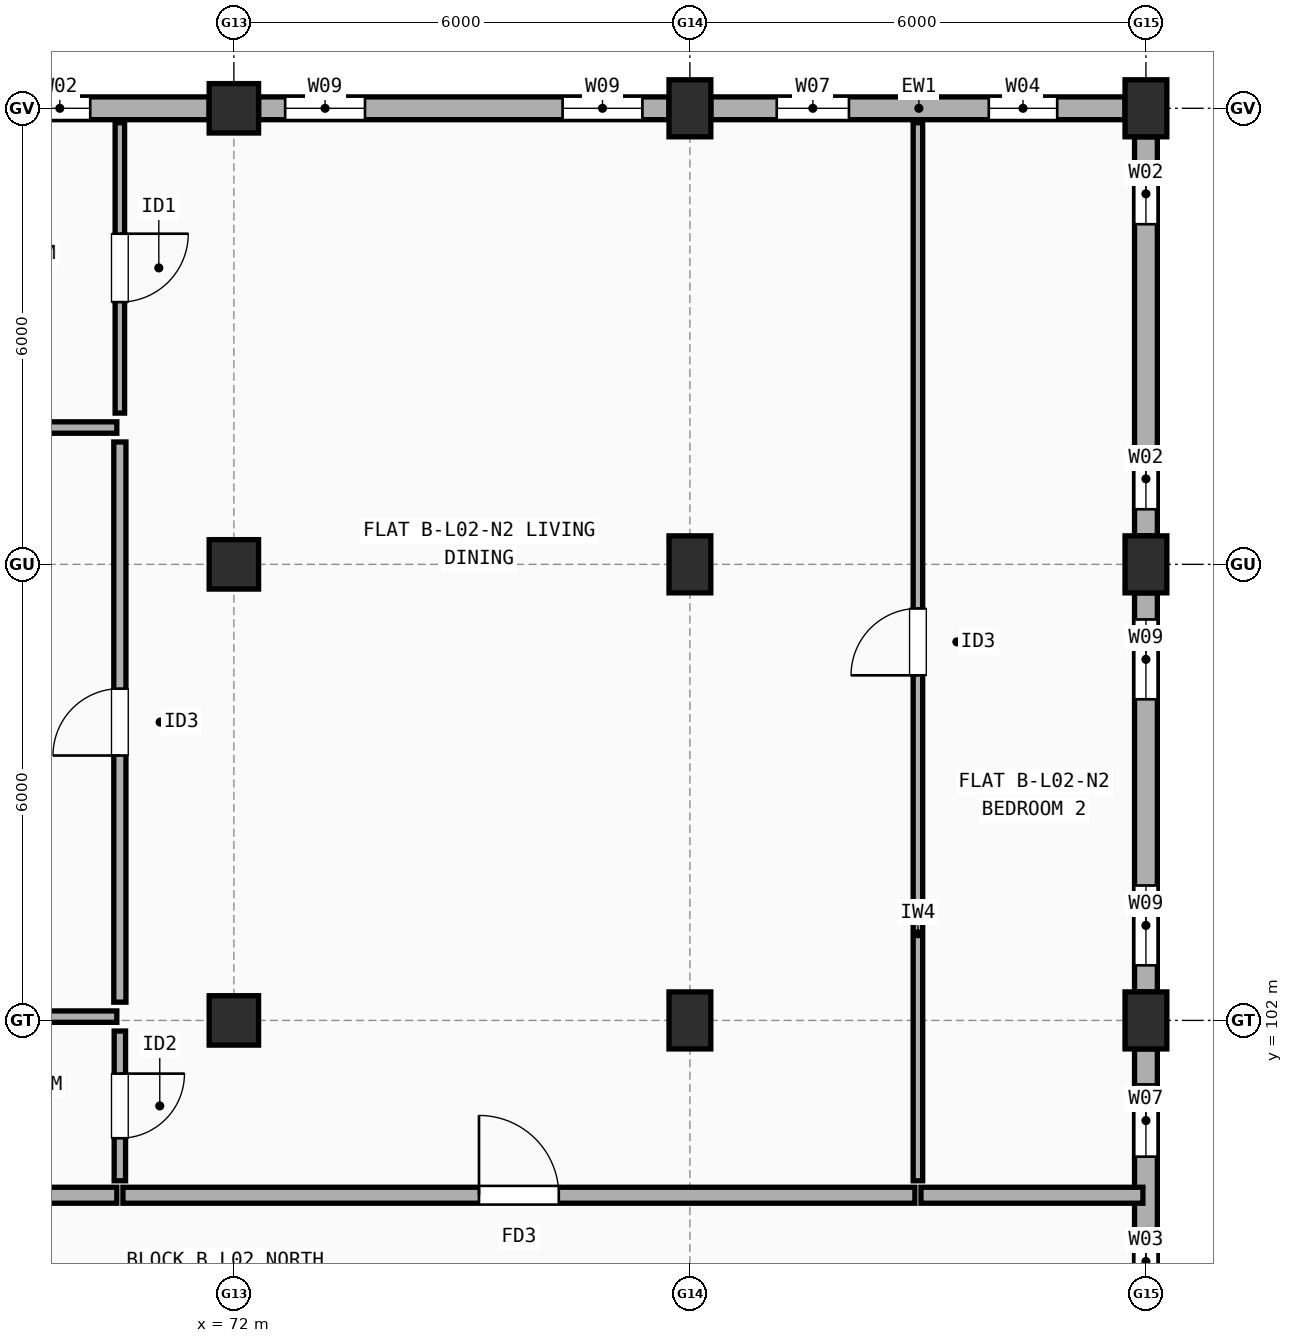
"""IFC4 building model, lengths in metres.
Left out: names, types, materials, properties, quantities, classifications, styles, units other than length and angle.
Written with IfcOpenShell. Run it as: python <this file> out.ifc"""

import sys

from ifc_helpers import new_model, si_unit, direction, frame, frame_2d, origin, origin_2d, place, context, subcontext, project, spatial, rectangle, extrude, element, fill, save


model = new_model("IFC4")
c1 = context("Model", 3, precision=1e-05, world=origin(), true_north=direction((0.0, 1.0)))
c2 = subcontext(c1, "Body", "Model", "MODEL_VIEW")
j1 = project(units=[si_unit("LENGTHUNIT", "METRE"), si_unit("PLANEANGLEUNIT", "RADIAN")], contexts=[c1])
p1 = place(None, origin())
s1 = spatial("IfcSite", under=j1, at=p1, CompositionType="ELEMENT")
p2 = place(p1, origin())
s2 = spatial("IfcBuilding", under=s1, at=p2, CompositionType="ELEMENT")
p3 = place(p2, frame((0.0, 0.0, 7.7)))
s3 = spatial("IfcBuildingStorey", under=s2, at=p3, CompositionType="ELEMENT", Elevation=7.7)
for number, where, z_axis, x_axis in (
    (1, (72.0, 102.0, 0.0), (0.0, 0.0, 1.0), (1.0, 0.0, 0.0)),
    (2, (72.0, 108.0, 0.0), (0.0, 0.0, 1.0), (1.0, 0.0, 0.0)),
    (3, (72.0, 114.0, 0.0), (0.0, 0.0, 1.0), (1.0, 0.0, 0.0)),
):
    element("IfcColumn", number, at=place(p3, frame(where, z_axis=z_axis, x_axis=x_axis)), inside=s3, PredefinedType="COLUMN", context=c2, shape_type="SweptSolid", body=[
        extrude(rectangle(XDim=0.65, YDim=0.65, at=origin_2d()), origin(), (0.0, 0.0, 1.0), 2.955),
    ])
for number, where, z_axis, x_axis in (
    (4, (78.0, 102.0, 0.0), (0.0, 0.0, 1.0), (1.0, 0.0, 0.0)),
    (5, (78.0, 108.0, 0.0), (0.0, 0.0, 1.0), (1.0, 0.0, 0.0)),
    (6, (78.0, 114.0, 0.0), (0.0, 0.0, 1.0), (1.0, 0.0, 0.0)),
    (7, (84.0, 102.0, 0.0), (0.0, 0.0, 1.0), (1.0, 0.0, 0.0)),
    (8, (84.0, 108.0, 0.0), (0.0, 0.0, 1.0), (1.0, 0.0, 0.0)),
    (9, (84.0, 114.0, 0.0), (0.0, 0.0, 1.0), (1.0, 0.0, 0.0)),
):
    element("IfcColumn", number, at=place(p3, frame(where, z_axis=z_axis, x_axis=x_axis)), inside=s3, PredefinedType="COLUMN", context=c2, shape_type="SweptSolid", body=[
        extrude(rectangle(XDim=0.55, YDim=0.75, at=origin_2d()), origin(), (0.0, 0.0, 1.0), 2.955),
    ])
p4 = place(p3, frame((84.0, 96.375, 0.0), z_axis=(0.0, 0.0, 1.0), x_axis=(0.0, 1.0, 0.0)))
e10 = element("IfcWall", 10, at=p4, inside=s3, PredefinedType="STANDARD", context=c2, shape_type="SweptSolid", body=[
    extrude(rectangle(XDim=5.25, YDim=0.3, at=frame_2d((2.625, 0.0))), origin(), (0.0, 0.0, 1.0), 2.437),
])
p5 = place(p4, frame((2.029, 0.0, 0.9)))
e11 = element("IfcOpeningElement", 11, at=p5, cuts=e10, PredefinedType="OPENING", context=c2, shape_type="SweptSolid", body=[
    extrude(rectangle(XDim=0.85, YDim=1.25, at=frame_2d((0.425, 0.625))), frame((0.0, 0.16, 0.0), z_axis=(0.0, -1.0, 0.0), x_axis=(1.0, 0.0, 0.0)), (0.0, 0.0, 1.0), 0.32),
])
p6 = place(p4, frame((3.833, 0.0, 0.9)))
e12 = element("IfcOpeningElement", 12, at=p6, cuts=e10, PredefinedType="OPENING", context=c2, shape_type="SweptSolid", body=[
    extrude(rectangle(XDim=0.95, YDim=1.35, at=frame_2d((0.475, 0.675))), frame((0.0, 0.16, 0.0), z_axis=(0.0, -1.0, 0.0), x_axis=(1.0, 0.0, 0.0)), (0.0, 0.0, 1.0), 0.32),
])
p7 = place(p3, frame((84.0, 102.375, 0.0), z_axis=(0.0, 0.0, 1.0), x_axis=(0.0, 1.0, 0.0)))
e13 = element("IfcWall", 13, at=p7, inside=s3, PredefinedType="STANDARD", context=c2, shape_type="SweptSolid", body=[
    extrude(rectangle(XDim=5.25, YDim=0.3, at=frame_2d((2.625, 0.0))), origin(), (0.0, 0.0, 1.0), 2.437),
])
p8 = place(p7, frame((0.35, 0.0, 0.9)))
e14 = element("IfcOpeningElement", 14, at=p8, cuts=e13, PredefinedType="OPENING", context=c2, shape_type="SweptSolid", body=[
    extrude(rectangle(XDim=1.05, YDim=1.35, at=frame_2d((0.525, 0.675))), frame((0.0, 0.16, 0.0), z_axis=(0.0, -1.0, 0.0), x_axis=(1.0, 0.0, 0.0)), (0.0, 0.0, 1.0), 0.32),
])
p9 = place(p7, frame((3.85, 0.0, 0.9)))
e15 = element("IfcOpeningElement", 15, at=p9, cuts=e13, PredefinedType="OPENING", context=c2, shape_type="SweptSolid", body=[
    extrude(rectangle(XDim=1.05, YDim=1.35, at=frame_2d((0.525, 0.675))), frame((0.0, 0.16, 0.0), z_axis=(0.0, -1.0, 0.0), x_axis=(1.0, 0.0, 0.0)), (0.0, 0.0, 1.0), 0.32),
])
p10 = place(p3, frame((84.0, 108.375, 0.0), z_axis=(0.0, 0.0, 1.0), x_axis=(0.0, 1.0, 0.0)))
e16 = element("IfcWall", 16, at=p10, inside=s3, PredefinedType="STANDARD", context=c2, shape_type="SweptSolid", body=[
    extrude(rectangle(XDim=5.25, YDim=0.3, at=frame_2d((2.625, 0.0))), origin(), (0.0, 0.0, 1.0), 2.437),
])
p11 = place(p10, frame((0.35, 0.0, 0.9)))
e17 = element("IfcOpeningElement", 17, at=p11, cuts=e16, PredefinedType="OPENING", context=c2, shape_type="SweptSolid", body=[
    extrude(rectangle(XDim=0.8, YDim=1.2, at=frame_2d((0.4, 0.6))), frame((0.0, 0.16, 0.0), z_axis=(0.0, -1.0, 0.0), x_axis=(1.0, 0.0, 0.0)), (0.0, 0.0, 1.0), 0.32),
])
p12 = place(p10, frame((4.1, 0.0, 0.9)))
e18 = element("IfcOpeningElement", 18, at=p12, cuts=e16, PredefinedType="OPENING", context=c2, shape_type="SweptSolid", body=[
    extrude(rectangle(XDim=0.8, YDim=1.2, at=frame_2d((0.4, 0.6))), frame((0.0, 0.16, 0.0), z_axis=(0.0, -1.0, 0.0), x_axis=(1.0, 0.0, 0.0)), (0.0, 0.0, 1.0), 0.32),
])
p13 = place(p3, frame((83.725, 114.0, 0.0), z_axis=(0.0, 0.0, 1.0), x_axis=(-1.0, 0.0, 0.0)))
e19 = element("IfcWall", 19, at=p13, inside=s3, PredefinedType="STANDARD", context=c2, shape_type="SweptSolid", body=[
    extrude(rectangle(XDim=5.45, YDim=0.3, at=frame_2d((2.725, 0.0))), origin(), (0.0, 0.0, 1.0), 2.437),
])
p14 = place(p13, frame((0.893, 0.0, 0.9)))
e20 = element("IfcOpeningElement", 20, at=p14, cuts=e19, PredefinedType="OPENING", context=c2, shape_type="SweptSolid", body=[
    extrude(rectangle(XDim=0.9, YDim=1.3, at=frame_2d((0.45, 0.65))), frame((0.0, 0.16, 0.0), z_axis=(0.0, -1.0, 0.0), x_axis=(1.0, 0.0, 0.0)), (0.0, 0.0, 1.0), 0.32),
])
p15 = place(p13, frame((3.633, 0.0, 0.9)))
e21 = element("IfcOpeningElement", 21, at=p15, cuts=e19, PredefinedType="OPENING", context=c2, shape_type="SweptSolid", body=[
    extrude(rectangle(XDim=0.95, YDim=1.35, at=frame_2d((0.475, 0.675))), frame((0.0, 0.16, 0.0), z_axis=(0.0, -1.0, 0.0), x_axis=(1.0, 0.0, 0.0)), (0.0, 0.0, 1.0), 0.32),
])
p16 = place(p3, frame((77.725, 114.0, 0.0), z_axis=(0.0, 0.0, 1.0), x_axis=(-1.0, 0.0, 0.0)))
e22 = element("IfcWall", 22, at=p16, inside=s3, PredefinedType="STANDARD", context=c2, shape_type="SweptSolid", body=[
    extrude(rectangle(XDim=5.4, YDim=0.3, at=frame_2d((2.7, 0.0))), origin(), (0.0, 0.0, 1.0), 2.437),
])
p17 = place(p16, frame((0.35, 0.0, 0.9)))
e23 = element("IfcOpeningElement", 23, at=p17, cuts=e22, PredefinedType="OPENING", context=c2, shape_type="SweptSolid", body=[
    extrude(rectangle(XDim=1.05, YDim=1.35, at=frame_2d((0.525, 0.675))), frame((0.0, 0.16, 0.0), z_axis=(0.0, -1.0, 0.0), x_axis=(1.0, 0.0, 0.0)), (0.0, 0.0, 1.0), 0.32),
])
p18 = place(p16, frame((4.0, 0.0, 0.9)))
e24 = element("IfcOpeningElement", 24, at=p18, cuts=e22, PredefinedType="OPENING", context=c2, shape_type="SweptSolid", body=[
    extrude(rectangle(XDim=1.05, YDim=1.35, at=frame_2d((0.525, 0.675))), frame((0.0, 0.16, 0.0), z_axis=(0.0, -1.0, 0.0), x_axis=(1.0, 0.0, 0.0)), (0.0, 0.0, 1.0), 0.32),
])
p19 = place(p3, frame((71.675, 114.0, 0.0), z_axis=(0.0, 0.0, 1.0), x_axis=(-1.0, 0.0, 0.0)))
e25 = element("IfcWall", 25, at=p19, inside=s3, PredefinedType="STANDARD", context=c2, shape_type="SweptSolid", body=[
    extrude(rectangle(XDim=5.35, YDim=0.3, at=frame_2d((2.675, 0.0))), origin(), (0.0, 0.0, 1.0), 2.437),
])
p20 = place(p19, frame((1.565, 0.0, 0.9)))
e26 = element("IfcOpeningElement", 26, at=p20, cuts=e25, PredefinedType="OPENING", context=c2, shape_type="SweptSolid", body=[
    extrude(rectangle(XDim=0.8, YDim=1.2, at=frame_2d((0.4, 0.6))), frame((0.0, 0.16, 0.0), z_axis=(0.0, -1.0, 0.0), x_axis=(1.0, 0.0, 0.0)), (0.0, 0.0, 1.0), 0.32),
])
p21 = place(p19, frame((4.2, 0.0, 0.9)))
e27 = element("IfcOpeningElement", 27, at=p21, cuts=e25, PredefinedType="OPENING", context=c2, shape_type="SweptSolid", body=[
    extrude(rectangle(XDim=0.8, YDim=1.2, at=frame_2d((0.4, 0.6))), frame((0.0, 0.16, 0.0), z_axis=(0.0, -1.0, 0.0), x_axis=(1.0, 0.0, 0.0)), (0.0, 0.0, 1.0), 0.32),
])
p22 = place(p3, frame((66.04, 99.7, 0.0), z_axis=(0.0, 0.0, 1.0), x_axis=(1.0, 0.0, 0.0)))
e28 = element("IfcWall", 28, at=p22, inside=s3, PredefinedType="SOLIDWALL", context=c2, shape_type="SweptSolid", body=[
    extrude(rectangle(XDim=4.42, YDim=0.21, at=frame_2d((2.21, 0.0))), origin(), (0.0, 0.0, 1.0), 2.955),
])
p23 = place(p3, frame((70.54, 99.7, 0.0), z_axis=(0.0, 0.0, 1.0), x_axis=(1.0, 0.0, 0.0)))
e29 = element("IfcWall", 29, at=p23, inside=s3, PredefinedType="SOLIDWALL", context=c2, shape_type="SweptSolid", body=[
    extrude(rectangle(XDim=10.42, YDim=0.21, at=frame_2d((5.21, 0.0))), origin(), (0.0, 0.0, 1.0), 2.437),
])
p24 = place(p23, frame((4.685, 0.0, 0.0)))
e30 = element("IfcOpeningElement", 30, at=p24, cuts=e29, PredefinedType="OPENING", context=c2, shape_type="SweptSolid", body=[
    extrude(rectangle(XDim=1.05, YDim=2.15, at=frame_2d((0.525, 1.075))), frame((0.0, 0.115, 0.0), z_axis=(0.0, -1.0, 0.0), x_axis=(1.0, 0.0, 0.0)), (0.0, 0.0, 1.0), 0.23),
])
p25 = place(p3, frame((70.5, 109.99, 0.0), z_axis=(0.0, 0.0, 1.0), x_axis=(0.0, 1.0, 0.0)))
e31 = element("IfcWall", 31, at=p25, inside=s3, PredefinedType="PARTITIONING", context=c2, shape_type="SweptSolid", body=[
    extrude(rectangle(XDim=3.82, YDim=0.125, at=frame_2d((1.91, 0.0))), origin(), (0.0, 0.0, 1.0), 2.955),
])
p26 = place(p25, frame((1.46, 0.0, 0.0)))
e32 = element("IfcOpeningElement", 32, at=p26, cuts=e31, PredefinedType="OPENING", context=c2, shape_type="SweptSolid", body=[
    extrude(rectangle(XDim=0.9, YDim=2.1, at=frame_2d((0.45, 1.05))), frame((0.0, 0.073, 0.0), z_axis=(0.0, -1.0, 0.0), x_axis=(1.0, 0.0, 0.0)), (0.0, 0.0, 1.0), 0.145),
])
p27 = place(p3, frame((70.5, 102.24, 0.0), z_axis=(0.0, 0.0, 1.0), x_axis=(0.0, 1.0, 0.0)))
e33 = element("IfcWall", 33, at=p27, inside=s3, PredefinedType="PLUMBINGWALL", context=c2, shape_type="SweptSolid", body=[
    extrude(rectangle(XDim=7.37, YDim=0.16, at=frame_2d((3.685, 0.0))), origin(), (0.0, 0.0, 1.0), 2.437),
])
p28 = place(p27, frame((3.245, 0.0, 0.0)))
e34 = element("IfcOpeningElement", 34, at=p28, cuts=e33, PredefinedType="OPENING", context=c2, shape_type="SweptSolid", body=[
    extrude(rectangle(XDim=0.88, YDim=2.1, at=frame_2d((0.44, 1.05))), frame((0.0, 0.09, 0.0), z_axis=(0.0, -1.0, 0.0), x_axis=(1.0, 0.0, 0.0)), (0.0, 0.0, 1.0), 0.18),
])
p29 = place(p3, frame((70.5, 99.89, 0.0), z_axis=(0.0, 0.0, 1.0), x_axis=(0.0, 1.0, 0.0)))
e35 = element("IfcWall", 35, at=p29, inside=s3, PredefinedType="PARTITIONING", context=c2, shape_type="SweptSolid", body=[
    extrude(rectangle(XDim=1.97, YDim=0.15, at=frame_2d((0.985, 0.0))), origin(), (0.0, 0.0, 1.0), 2.955),
])
p30 = place(p29, frame((0.56, 0.0, 0.0)))
e36 = element("IfcOpeningElement", 36, at=p30, cuts=e35, PredefinedType="OPENING", context=c2, shape_type="SweptSolid", body=[
    extrude(rectangle(XDim=0.85, YDim=2.1, at=frame_2d((0.425, 1.05))), frame((0.0, 0.085, 0.0), z_axis=(0.0, -1.0, 0.0), x_axis=(1.0, 0.0, 0.0)), (0.0, 0.0, 1.0), 0.17),
])
p31 = place(p3, frame((66.04, 109.8, 0.0), z_axis=(0.0, 0.0, 1.0), x_axis=(1.0, 0.0, 0.0)))
e37 = element("IfcWall", 37, at=p31, inside=s3, PredefinedType="PARTITIONING", context=c2, shape_type="SweptSolid", body=[
    extrude(rectangle(XDim=4.42, YDim=0.15, at=frame_2d((2.21, 0.0))), origin(), (0.0, 0.0, 1.0), 2.337),
])
p32 = place(p3, frame((66.36, 102.05, 0.0), z_axis=(0.0, 0.0, 1.0), x_axis=(1.0, 0.0, 0.0)))
e38 = element("IfcWall", 38, at=p32, inside=s3, PredefinedType="PARTITIONING", context=c2, shape_type="SweptSolid", body=[
    extrude(rectangle(XDim=4.1, YDim=0.15, at=frame_2d((2.05, 0.0))), origin(), (0.0, 0.0, 1.0), 2.437),
])
p33 = place(p3, frame((81.04, 99.7, 0.0), z_axis=(0.0, 0.0, 1.0), x_axis=(1.0, 0.0, 0.0)))
e39 = element("IfcWall", 39, at=p33, inside=s3, PredefinedType="SOLIDWALL", context=c2, shape_type="SweptSolid", body=[
    extrude(rectangle(XDim=2.92, YDim=0.21, at=frame_2d((1.46, 0.0))), origin(), (0.0, 0.0, 1.0), 2.437),
])
p34 = place(p3, frame((81.0, 99.89, 0.0), z_axis=(0.0, 0.0, 1.0), x_axis=(0.0, 1.0, 0.0)))
e40 = element("IfcWall", 40, at=p34, inside=s3, PredefinedType="PARTITIONING", context=c2, shape_type="SweptSolid", body=[
    extrude(rectangle(XDim=13.92, YDim=0.125, at=frame_2d((6.96, 0.0))), origin(), (0.0, 0.0, 1.0), 2.437),
])
p35 = place(p34, frame((6.65, 0.0, 0.0)))
e41 = element("IfcOpeningElement", 41, at=p35, cuts=e40, PredefinedType="OPENING", context=c2, shape_type="SweptSolid", body=[
    extrude(rectangle(XDim=0.88, YDim=2.1, at=frame_2d((0.44, 1.05))), frame((0.0, 0.073, 0.0), z_axis=(0.0, -1.0, 0.0), x_axis=(1.0, 0.0, 0.0)), (0.0, 0.0, 1.0), 0.145),
])
p36 = place(p5, origin())
e42 = element("IfcWindow", 42, at=p36, inside=s3, PartitioningType="SINGLE_PANEL", PredefinedType="WINDOW", context=c2, shape_type="SweptSolid", body=[
    extrude(rectangle(XDim=0.85, YDim=1.25, at=frame_2d((0.425, 0.625))), frame((0.0, 0.03, 0.0), z_axis=(0.0, -1.0, 0.0), x_axis=(1.0, 0.0, 0.0)), (0.0, 0.0, 1.0), 0.06),
])
fill(e11, e42)
p37 = place(p6, origin())
e43 = element("IfcWindow", 43, at=p37, inside=s3, PartitioningType="SINGLE_PANEL", PredefinedType="WINDOW", context=c2, shape_type="SweptSolid", body=[
    extrude(rectangle(XDim=0.95, YDim=1.35, at=frame_2d((0.475, 0.675))), frame((0.0, 0.03, 0.0), z_axis=(0.0, -1.0, 0.0), x_axis=(1.0, 0.0, 0.0)), (0.0, 0.0, 1.0), 0.06),
])
fill(e12, e43)
p38 = place(p8, origin())
e44 = element("IfcWindow", 44, at=p38, inside=s3, PartitioningType="SINGLE_PANEL", PredefinedType="WINDOW", context=c2, shape_type="SweptSolid", body=[
    extrude(rectangle(XDim=1.05, YDim=1.35, at=frame_2d((0.525, 0.675))), frame((0.0, 0.03, 0.0), z_axis=(0.0, -1.0, 0.0), x_axis=(1.0, 0.0, 0.0)), (0.0, 0.0, 1.0), 0.06),
])
fill(e14, e44)
p39 = place(p9, origin())
e45 = element("IfcWindow", 45, at=p39, inside=s3, PartitioningType="SINGLE_PANEL", PredefinedType="WINDOW", context=c2, shape_type="SweptSolid", body=[
    extrude(rectangle(XDim=1.05, YDim=1.35, at=frame_2d((0.525, 0.675))), frame((0.0, 0.03, 0.0), z_axis=(0.0, -1.0, 0.0), x_axis=(1.0, 0.0, 0.0)), (0.0, 0.0, 1.0), 0.06),
])
fill(e15, e45)
p40 = place(p11, origin())
e46 = element("IfcWindow", 46, at=p40, inside=s3, PartitioningType="SINGLE_PANEL", PredefinedType="WINDOW", context=c2, shape_type="SweptSolid", body=[
    extrude(rectangle(XDim=0.8, YDim=1.2, at=frame_2d((0.4, 0.6))), frame((0.0, 0.03, 0.0), z_axis=(0.0, -1.0, 0.0), x_axis=(1.0, 0.0, 0.0)), (0.0, 0.0, 1.0), 0.06),
])
fill(e17, e46)
p41 = place(p12, origin())
e47 = element("IfcWindow", 47, at=p41, inside=s3, PartitioningType="SINGLE_PANEL", PredefinedType="WINDOW", context=c2, shape_type="SweptSolid", body=[
    extrude(rectangle(XDim=0.8, YDim=1.2, at=frame_2d((0.4, 0.6))), frame((0.0, 0.03, 0.0), z_axis=(0.0, -1.0, 0.0), x_axis=(1.0, 0.0, 0.0)), (0.0, 0.0, 1.0), 0.06),
])
fill(e18, e47)
p42 = place(p14, origin())
e48 = element("IfcWindow", 48, at=p42, inside=s3, PartitioningType="SINGLE_PANEL", PredefinedType="WINDOW", context=c2, shape_type="SweptSolid", body=[
    extrude(rectangle(XDim=0.9, YDim=1.3, at=frame_2d((0.45, 0.65))), frame((0.0, 0.03, 0.0), z_axis=(0.0, -1.0, 0.0), x_axis=(1.0, 0.0, 0.0)), (0.0, 0.0, 1.0), 0.06),
])
fill(e20, e48)
p43 = place(p15, origin())
e49 = element("IfcWindow", 49, at=p43, inside=s3, PartitioningType="SINGLE_PANEL", PredefinedType="WINDOW", context=c2, shape_type="SweptSolid", body=[
    extrude(rectangle(XDim=0.95, YDim=1.35, at=frame_2d((0.475, 0.675))), frame((0.0, 0.03, 0.0), z_axis=(0.0, -1.0, 0.0), x_axis=(1.0, 0.0, 0.0)), (0.0, 0.0, 1.0), 0.06),
])
fill(e21, e49)
p44 = place(p17, origin())
e50 = element("IfcWindow", 50, at=p44, inside=s3, PartitioningType="SINGLE_PANEL", PredefinedType="WINDOW", context=c2, shape_type="SweptSolid", body=[
    extrude(rectangle(XDim=1.05, YDim=1.35, at=frame_2d((0.525, 0.675))), frame((0.0, 0.03, 0.0), z_axis=(0.0, -1.0, 0.0), x_axis=(1.0, 0.0, 0.0)), (0.0, 0.0, 1.0), 0.06),
])
fill(e23, e50)
p45 = place(p18, origin())
e51 = element("IfcWindow", 51, at=p45, inside=s3, PartitioningType="SINGLE_PANEL", PredefinedType="WINDOW", context=c2, shape_type="SweptSolid", body=[
    extrude(rectangle(XDim=1.05, YDim=1.35, at=frame_2d((0.525, 0.675))), frame((0.0, 0.03, 0.0), z_axis=(0.0, -1.0, 0.0), x_axis=(1.0, 0.0, 0.0)), (0.0, 0.0, 1.0), 0.06),
])
fill(e24, e51)
p46 = place(p20, origin())
e52 = element("IfcWindow", 52, at=p46, inside=s3, PartitioningType="SINGLE_PANEL", PredefinedType="WINDOW", context=c2, shape_type="SweptSolid", body=[
    extrude(rectangle(XDim=0.8, YDim=1.2, at=frame_2d((0.4, 0.6))), frame((0.0, 0.03, 0.0), z_axis=(0.0, -1.0, 0.0), x_axis=(1.0, 0.0, 0.0)), (0.0, 0.0, 1.0), 0.06),
])
fill(e26, e52)
p47 = place(p24, origin())
e53 = element("IfcDoor", 53, at=p47, inside=s3, OperationType="SINGLE_SWING_LEFT", PredefinedType="DOOR", context=c2, shape_type="SweptSolid", body=[
    extrude(rectangle(XDim=1.05, YDim=2.15, at=frame_2d((0.525, 1.075))), frame((0.0, 0.025, 0.0), z_axis=(0.0, -1.0, 0.0), x_axis=(1.0, 0.0, 0.0)), (0.0, 0.0, 1.0), 0.05),
])
fill(e30, e53)
p48 = place(p26, origin())
e54 = element("IfcDoor", 54, at=p48, inside=s3, OperationType="SINGLE_SWING_RIGHT", PredefinedType="DOOR", context=c2, shape_type="SweptSolid", body=[
    extrude(rectangle(XDim=0.9, YDim=2.1, at=frame_2d((0.45, 1.05))), frame((0.0, 0.025, 0.0), z_axis=(0.0, -1.0, 0.0), x_axis=(1.0, 0.0, 0.0)), (0.0, 0.0, 1.0), 0.05),
])
fill(e32, e54)
p49 = place(p28, origin())
e55 = element("IfcDoor", 55, at=p49, inside=s3, OperationType="SINGLE_SWING_LEFT", PredefinedType="DOOR", context=c2, shape_type="SweptSolid", body=[
    extrude(rectangle(XDim=0.88, YDim=2.1, at=frame_2d((0.44, 1.05))), frame((0.0, 0.025, 0.0), z_axis=(0.0, -1.0, 0.0), x_axis=(1.0, 0.0, 0.0)), (0.0, 0.0, 1.0), 0.05),
])
fill(e34, e55)
p50 = place(p30, origin())
e56 = element("IfcDoor", 56, at=p50, inside=s3, OperationType="SINGLE_SWING_RIGHT", PredefinedType="DOOR", context=c2, shape_type="SweptSolid", body=[
    extrude(rectangle(XDim=0.85, YDim=2.1, at=frame_2d((0.425, 1.05))), frame((0.0, 0.025, 0.0), z_axis=(0.0, -1.0, 0.0), x_axis=(1.0, 0.0, 0.0)), (0.0, 0.0, 1.0), 0.05),
])
fill(e36, e56)
p51 = place(p35, origin())
e57 = element("IfcDoor", 57, at=p51, inside=s3, OperationType="SINGLE_SWING_LEFT", PredefinedType="DOOR", context=c2, shape_type="SweptSolid", body=[
    extrude(rectangle(XDim=0.88, YDim=2.1, at=frame_2d((0.44, 1.05))), frame((0.0, 0.025, 0.0), z_axis=(0.0, -1.0, 0.0), x_axis=(1.0, 0.0, 0.0)), (0.0, 0.0, 1.0), 0.05),
])
fill(e41, e57)
save(model, sys.argv[1])
